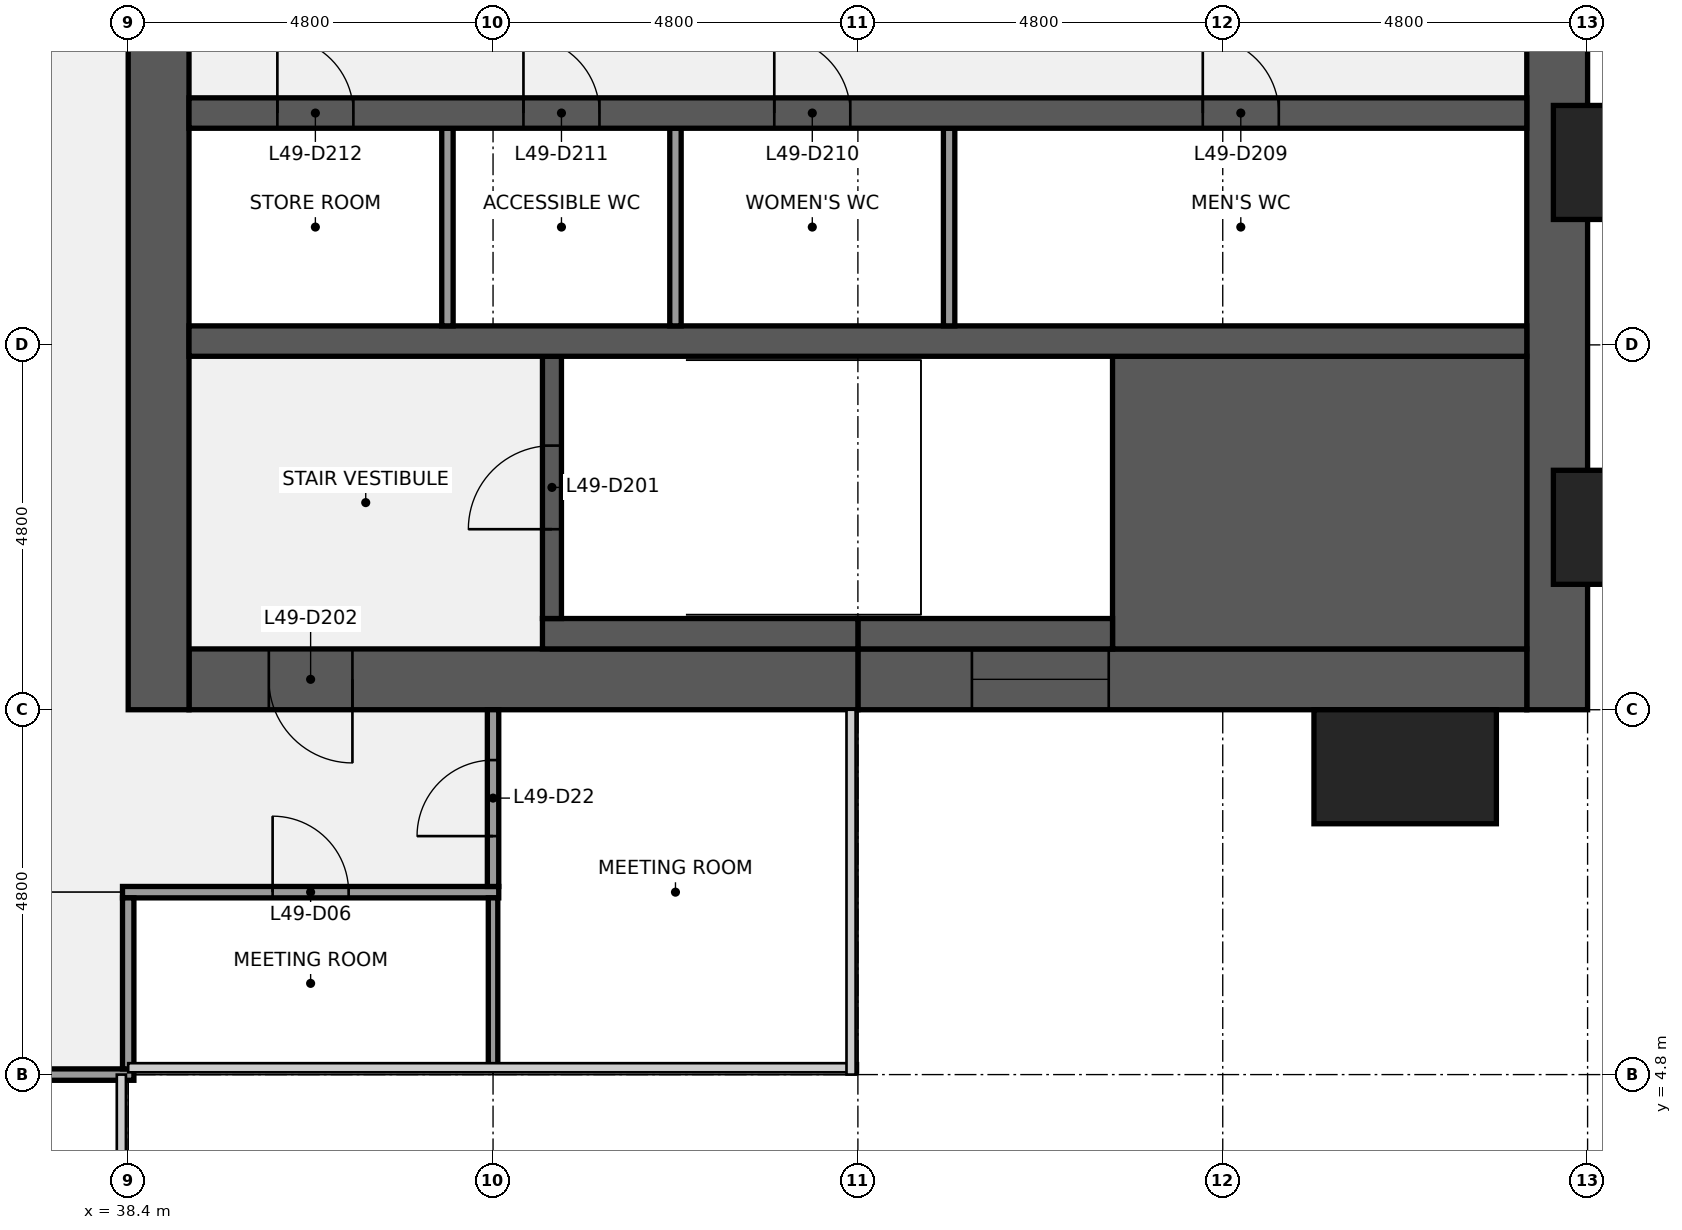
"""IFC4 building model, lengths in metres.
Left out: names, types, materials, properties, quantities, classifications, styles, units other than length and angle.
Written with IfcOpenShell. Run it as: python <this file> out.ifc"""

import sys

from ifc_helpers import new_model, si_unit, direction, frame, frame_2d, origin, origin_2d, place, context, subcontext, project, spatial, rectangle, extrude, element, fill, save


model = new_model("IFC4")
c1 = context("Model", 3, precision=1e-05, world=origin(), true_north=direction((0.0, 1.0)))
c2 = subcontext(c1, "Body", "Model", "MODEL_VIEW")
j1 = project(units=[si_unit("LENGTHUNIT", "METRE"), si_unit("PLANEANGLEUNIT", "RADIAN")], contexts=[c1])
p1 = place(None, origin())
s1 = spatial("IfcSite", under=j1, at=p1, CompositionType="ELEMENT")
p2 = place(p1, origin())
s2 = spatial("IfcBuilding", under=s1, at=p2, CompositionType="ELEMENT")
p3 = place(p2, frame((0.0, 0.0, 225.2)))
s3 = spatial("IfcBuildingStorey", under=s2, at=p3, CompositionType="ELEMENT", Elevation=225.2)
p4 = place(p3, frame((57.2, 38.4, 0.0), z_axis=(0.0, 0.0, 1.0), x_axis=(0.0, -1.0, 0.0)))
e1 = element("IfcWall", 1, at=p4, inside=s3, PredefinedType="SHEAR", context=c2, shape_type="SweptSolid", body=[
    extrude(rectangle(XDim=28.8, YDim=0.8, at=frame_2d((14.4, 0.0))), origin(), (0.0, 0.0, 1.0), 3.84),
])
p5 = place(p4, frame((18.45, 0.0, 0.9)))
e2 = element("IfcOpeningElement", 2, at=p5, cuts=e1, PredefinedType="OPENING", context=c2, shape_type="SweptSolid", body=[
    extrude(rectangle(XDim=1.5, YDim=1.5, at=frame_2d((0.75, 0.75))), frame((0.0, 0.41, 0.0), z_axis=(0.0, -1.0, 0.0), x_axis=(1.0, 0.0, 0.0)), (0.0, 0.0, 1.0), 0.82),
])
p6 = place(p4, frame((8.85, 0.0, 0.9)))
e3 = element("IfcOpeningElement", 3, at=p6, cuts=e1, PredefinedType="OPENING", context=c2, shape_type="SweptSolid", body=[
    extrude(rectangle(XDim=1.5, YDim=1.5, at=frame_2d((0.75, 0.75))), frame((0.0, 0.41, 0.0), z_axis=(0.0, -1.0, 0.0), x_axis=(1.0, 0.0, 0.0)), (0.0, 0.0, 1.0), 0.82),
])
p7 = place(p3, frame((56.8, 10.0, 0.0), z_axis=(0.0, 0.0, 1.0), x_axis=(-1.0, 0.0, 0.0)))
e4 = element("IfcWall", 4, at=p7, inside=s3, PredefinedType="SHEAR", context=c2, shape_type="SweptSolid", body=[
    extrude(rectangle(XDim=8.8, YDim=0.8, at=frame_2d((4.4, 0.0))), origin(), (0.0, 0.0, 1.0), 3.84),
])
p8 = place(p7, frame((5.5, 0.0, 0.9)))
e5 = element("IfcOpeningElement", 5, at=p8, cuts=e4, PredefinedType="OPENING", context=c2, shape_type="SweptSolid", body=[
    extrude(rectangle(XDim=1.8, YDim=1.5, at=frame_2d((0.9, 0.75))), frame((0.0, 0.41, 0.0), z_axis=(0.0, -1.0, 0.0), x_axis=(1.0, 0.0, 0.0)), (0.0, 0.0, 1.0), 0.82),
])
p9 = place(p3, frame((48.0, 10.0, 0.0), z_axis=(0.0, 0.0, 1.0), x_axis=(-1.0, 0.0, 0.0)))
e6 = element("IfcWall", 6, at=p9, inside=s3, PredefinedType="SHEAR", context=c2, shape_type="SweptSolid", body=[
    extrude(rectangle(XDim=8.8, YDim=0.8, at=frame_2d((4.4, 0.0))), origin(), (0.0, 0.0, 1.0), 3.84),
])
p10 = place(p9, frame((6.65, 0.0, 0.0)))
e7 = element("IfcOpeningElement", 7, at=p10, cuts=e6, PredefinedType="OPENING", context=c2, shape_type="SweptSolid", body=[
    extrude(rectangle(XDim=1.1, YDim=2.1, at=frame_2d((0.55, 1.05))), frame((0.0, 0.41, 0.0), z_axis=(0.0, -1.0, 0.0), x_axis=(1.0, 0.0, 0.0)), (0.0, 0.0, 1.0), 0.82),
])
p11 = place(p3, frame((38.8, 9.6, 0.0), z_axis=(0.0, 0.0, 1.0), x_axis=(0.0, 1.0, 0.0)))
e8 = element("IfcWall", 8, at=p11, inside=s3, PredefinedType="SHEAR", context=c2, shape_type="SweptSolid", body=[
    extrude(rectangle(XDim=28.8, YDim=0.8, at=frame_2d((14.4, 0.0))), origin(), (0.0, 0.0, 1.0), 3.84),
])
p12 = place(p11, frame((8.7, 0.0, 0.0)))
e9 = element("IfcOpeningElement", 9, at=p12, cuts=e8, PredefinedType="OPENING", context=c2, shape_type="SweptSolid", body=[
    extrude(rectangle(XDim=1.8, YDim=2.1, at=frame_2d((0.9, 1.05))), frame((0.0, 0.41, 0.0), z_axis=(0.0, -1.0, 0.0), x_axis=(1.0, 0.0, 0.0)), (0.0, 0.0, 1.0), 0.82),
])
p13 = place(p11, frame((18.3, 0.0, 0.0)))
e10 = element("IfcOpeningElement", 10, at=p13, cuts=e8, PredefinedType="OPENING", context=c2, shape_type="SweptSolid", body=[
    extrude(rectangle(XDim=1.8, YDim=2.1, at=frame_2d((0.9, 1.05))), frame((0.0, 0.41, 0.0), z_axis=(0.0, -1.0, 0.0), x_axis=(1.0, 0.0, 0.0)), (0.0, 0.0, 1.0), 0.82),
])
p14 = place(p3, frame((51.35, 12.325, 0.0), z_axis=(0.0, 0.0, 1.0), x_axis=(1.0, 0.0, 0.0)))
e11 = element("IfcWall", 11, at=p14, inside=s3, PredefinedType="SHEAR", context=c2, shape_type="SweptSolid", body=[
    extrude(rectangle(XDim=5.45, YDim=3.85, at=frame_2d((2.725, 0.0))), origin(), (0.0, 0.0, 1.0), 3.84),
])
p15 = place(p3, frame((48.0, 10.6, 0.0), z_axis=(0.0, 0.0, 1.0), x_axis=(1.0, 0.0, 0.0)))
e12 = element("IfcWall", 12, at=p15, inside=s3, PredefinedType="SHEAR", context=c2, shape_type="SweptSolid", body=[
    extrude(rectangle(XDim=3.35, YDim=0.4, at=frame_2d((1.675, 0.0))), origin(), (0.0, 0.0, 1.0), 3.84),
])
p16 = place(p3, frame((43.85, 10.6, 0.0), z_axis=(0.0, 0.0, 1.0), x_axis=(1.0, 0.0, 0.0)))
e13 = element("IfcWall", 13, at=p16, inside=s3, PredefinedType="SHEAR", context=c2, shape_type="SweptSolid", body=[
    extrude(rectangle(XDim=4.15, YDim=0.4, at=frame_2d((2.075, 0.0))), origin(), (0.0, 0.0, 1.0), 3.84),
])
p17 = place(p3, frame((43.975, 10.8, 0.0), z_axis=(0.0, 0.0, 1.0), x_axis=(0.0, 1.0, 0.0)))
e14 = element("IfcWall", 14, at=p17, inside=s3, PredefinedType="SHEAR", context=c2, shape_type="SweptSolid", body=[
    extrude(rectangle(XDim=3.45, YDim=0.25, at=frame_2d((1.725, 0.0))), origin(), (0.0, 0.0, 1.0), 3.84),
])
p18 = place(p17, frame((1.175, 0.0, 0.0)))
e15 = element("IfcOpeningElement", 15, at=p18, cuts=e14, PredefinedType="OPENING", context=c2, shape_type="SweptSolid", body=[
    extrude(rectangle(XDim=1.1, YDim=2.1, at=frame_2d((0.55, 1.05))), frame((0.0, 0.135, 0.0), z_axis=(0.0, -1.0, 0.0), x_axis=(1.0, 0.0, 0.0)), (0.0, 0.0, 1.0), 0.27),
])
p19 = place(p3, frame((39.2, 14.45, 0.0), z_axis=(0.0, 0.0, 1.0), x_axis=(1.0, 0.0, 0.0)))
e16 = element("IfcWall", 16, at=p19, inside=s3, PredefinedType="SHEAR", context=c2, shape_type="SweptSolid", body=[
    extrude(rectangle(XDim=17.6, YDim=0.4, at=frame_2d((8.8, 0.0))), origin(), (0.0, 0.0, 1.0), 3.84),
])
for number, where, z_axis, x_axis in (
    (17, (49.2, 14.65, 0.0), (0.0, 0.0, 1.0), (0.0, 1.0, 0.0)),
    (18, (45.6, 14.65, 0.0), (0.0, 0.0, 1.0), (0.0, 1.0, 0.0)),
    (19, (42.6, 14.65, 0.0), (0.0, 0.0, 1.0), (0.0, 1.0, 0.0)),
):
    element("IfcWall", number, at=place(p3, frame(where, z_axis=z_axis, x_axis=x_axis)), inside=s3, PredefinedType="PARTITIONING", context=c2, shape_type="SweptSolid", body=[
        extrude(rectangle(XDim=2.6, YDim=0.15, at=frame_2d((1.3, 0.0))), origin(), (0.0, 0.0, 1.0), 3.84),
    ])
p20 = place(p3, frame((39.2, 17.45, 0.0), z_axis=(0.0, 0.0, 1.0), x_axis=(1.0, 0.0, 0.0)))
e20 = element("IfcWall", 20, at=p20, inside=s3, PredefinedType="SHEAR", context=c2, shape_type="SweptSolid", body=[
    extrude(rectangle(XDim=17.6, YDim=0.4, at=frame_2d((8.8, 0.0))), origin(), (0.0, 0.0, 1.0), 3.84),
])
p21 = place(p20, frame((13.337, 0.0, 0.0)))
e21 = element("IfcOpeningElement", 21, at=p21, cuts=e20, PredefinedType="OPENING", context=c2, shape_type="SweptSolid", body=[
    extrude(rectangle(XDim=1.0, YDim=2.1, at=frame_2d((0.5, 1.05))), frame((0.0, 0.21, 0.0), z_axis=(0.0, -1.0, 0.0), x_axis=(1.0, 0.0, 0.0)), (0.0, 0.0, 1.0), 0.42),
])
p22 = place(p20, frame((7.7, 0.0, 0.0)))
e22 = element("IfcOpeningElement", 22, at=p22, cuts=e20, PredefinedType="OPENING", context=c2, shape_type="SweptSolid", body=[
    extrude(rectangle(XDim=1.0, YDim=2.1, at=frame_2d((0.5, 1.05))), frame((0.0, 0.21, 0.0), z_axis=(0.0, -1.0, 0.0), x_axis=(1.0, 0.0, 0.0)), (0.0, 0.0, 1.0), 0.42),
])
p23 = place(p20, frame((4.4, 0.0, 0.0)))
e23 = element("IfcOpeningElement", 23, at=p23, cuts=e20, PredefinedType="OPENING", context=c2, shape_type="SweptSolid", body=[
    extrude(rectangle(XDim=1.0, YDim=2.1, at=frame_2d((0.5, 1.05))), frame((0.0, 0.21, 0.0), z_axis=(0.0, -1.0, 0.0), x_axis=(1.0, 0.0, 0.0)), (0.0, 0.0, 1.0), 0.42),
])
p24 = place(p20, frame((1.163, 0.0, 0.0)))
e24 = element("IfcOpeningElement", 24, at=p24, cuts=e20, PredefinedType="OPENING", context=c2, shape_type="SweptSolid", body=[
    extrude(rectangle(XDim=1.0, YDim=2.1, at=frame_2d((0.5, 1.05))), frame((0.0, 0.21, 0.0), z_axis=(0.0, -1.0, 0.0), x_axis=(1.0, 0.0, 0.0)), (0.0, 0.0, 1.0), 0.42),
])
p25 = place(p3, frame((19.125, 4.8, 0.0), z_axis=(0.0, 0.0, 1.0), x_axis=(1.0, 0.0, 0.0)))
e25 = element("IfcWall", 25, at=p25, inside=s3, PredefinedType="PARTITIONING", context=c2, shape_type="SweptSolid", body=[
    extrude(rectangle(XDim=19.35, YDim=0.15, at=frame_2d((9.675, 0.0))), origin(), (0.0, 0.0, 1.0), 2.87),
])
p26 = place(p25, frame((0.775, 0.0, 0.0)))
e26 = element("IfcOpeningElement", 26, at=p26, cuts=e25, PredefinedType="OPENING", context=c2, shape_type="SweptSolid", body=[
    extrude(rectangle(XDim=1.0, YDim=2.1, at=frame_2d((0.5, 1.05))), frame((0.0, 0.085, 0.0), z_axis=(0.0, -1.0, 0.0), x_axis=(1.0, 0.0, 0.0)), (0.0, 0.0, 1.0), 0.17),
])
p27 = place(p25, frame((10.375, 0.0, 0.0)))
e27 = element("IfcOpeningElement", 27, at=p27, cuts=e25, PredefinedType="OPENING", context=c2, shape_type="SweptSolid", body=[
    extrude(rectangle(XDim=1.0, YDim=2.1, at=frame_2d((0.5, 1.05))), frame((0.0, 0.085, 0.0), z_axis=(0.0, -1.0, 0.0), x_axis=(1.0, 0.0, 0.0)), (0.0, 0.0, 1.0), 0.17),
])
p28 = place(p3, frame((38.325, 7.2, 0.0), z_axis=(0.0, 0.0, 1.0), x_axis=(1.0, 0.0, 0.0)))
e28 = element("IfcWall", 28, at=p28, inside=s3, PredefinedType="PARTITIONING", context=c2, shape_type="SweptSolid", body=[
    extrude(rectangle(XDim=4.95, YDim=0.15, at=frame_2d((2.475, 0.0))), origin(), (0.0, 0.0, 1.0), 2.87),
])
p29 = place(p28, frame((1.975, 0.0, 0.0)))
e29 = element("IfcOpeningElement", 29, at=p29, cuts=e28, PredefinedType="OPENING", context=c2, shape_type="SweptSolid", body=[
    extrude(rectangle(XDim=1.0, YDim=2.1, at=frame_2d((0.5, 1.05))), frame((0.0, 0.085, 0.0), z_axis=(0.0, -1.0, 0.0), x_axis=(1.0, 0.0, 0.0)), (0.0, 0.0, 1.0), 0.17),
])
p30 = place(p3, frame((38.4, 4.875, 0.0), z_axis=(0.0, 0.0, 1.0), x_axis=(0.0, 1.0, 0.0)))
e30 = element("IfcWall", 30, at=p30, inside=s3, PredefinedType="PARTITIONING", context=c2, shape_type="SweptSolid", body=[
    extrude(rectangle(XDim=2.25, YDim=0.15, at=frame_2d((1.125, 0.0))), origin(), (0.0, 0.0, 1.0), 2.87),
])
p31 = place(p3, frame((43.2, 4.9, 0.0), z_axis=(0.0, 0.0, 1.0), x_axis=(0.0, 1.0, 0.0)))
e31 = element("IfcWall", 31, at=p31, inside=s3, PredefinedType="PARTITIONING", context=c2, shape_type="SweptSolid", body=[
    extrude(rectangle(XDim=2.225, YDim=0.125, at=frame_2d((1.113, 0.0))), origin(), (0.0, 0.0, 1.0), 2.87),
])
p32 = place(p3, frame((43.2, 7.275, 0.0), z_axis=(0.0, 0.0, 1.0), x_axis=(0.0, 1.0, 0.0)))
e32 = element("IfcWall", 32, at=p32, inside=s3, PredefinedType="PARTITIONING", context=c2, shape_type="SweptSolid", body=[
    extrude(rectangle(XDim=2.325, YDim=0.15, at=frame_2d((1.163, 0.0))), origin(), (0.0, 0.0, 1.0), 2.87),
])
p33 = place(p32, frame((0.663, 0.0, 0.0)))
e33 = element("IfcOpeningElement", 33, at=p33, cuts=e32, PredefinedType="OPENING", context=c2, shape_type="SweptSolid", body=[
    extrude(rectangle(XDim=1.0, YDim=2.1, at=frame_2d((0.5, 1.05))), frame((0.0, 0.085, 0.0), z_axis=(0.0, -1.0, 0.0), x_axis=(1.0, 0.0, 0.0)), (0.0, 0.0, 1.0), 0.17),
])
for number, where, z_axis, x_axis in (
    (34, (55.2, 8.85, 0.0), (0.0, 0.0, 1.0), (1.0, 0.0, 0.0)),
    (35, (58.35, 12.0, 0.0), (0.0, 0.0, 1.0), (0.0, 1.0, 0.0)),
    (36, (58.35, 16.8, 0.0), (0.0, 0.0, 1.0), (0.0, 1.0, 0.0)),
):
    element("IfcColumn", number, at=place(p3, frame(where, z_axis=z_axis, x_axis=x_axis)), inside=s3, PredefinedType="PILASTER", context=c2, shape_type="SweptSolid", body=[
        extrude(rectangle(XDim=2.4, YDim=1.5, at=origin_2d()), origin(), (0.0, 0.0, 1.0), 4.0),
    ])
p34 = place(p18, origin())
e37 = element("IfcDoor", 37, at=p34, inside=s3, OperationType="SINGLE_SWING_LEFT", PredefinedType="DOOR", context=c2, shape_type="SweptSolid", body=[
    extrude(rectangle(XDim=1.1, YDim=2.1, at=frame_2d((0.55, 1.05))), frame((0.0, 0.025, 0.0), z_axis=(0.0, -1.0, 0.0), x_axis=(1.0, 0.0, 0.0)), (0.0, 0.0, 1.0), 0.05),
])
fill(e15, e37)
p35 = place(p10, origin())
e38 = element("IfcDoor", 38, at=p35, inside=s3, OperationType="SINGLE_SWING_LEFT", PredefinedType="DOOR", context=c2, shape_type="SweptSolid", body=[
    extrude(rectangle(XDim=1.1, YDim=2.1, at=frame_2d((0.55, 1.05))), frame((0.0, 0.025, 0.0), z_axis=(0.0, -1.0, 0.0), x_axis=(1.0, 0.0, 0.0)), (0.0, 0.0, 1.0), 0.05),
])
fill(e7, e38)
p36 = place(p21, origin())
e39 = element("IfcDoor", 39, at=p36, inside=s3, OperationType="SINGLE_SWING_LEFT", PredefinedType="DOOR", context=c2, shape_type="SweptSolid", body=[
    extrude(rectangle(XDim=1.0, YDim=2.1, at=frame_2d((0.5, 1.05))), frame((0.0, 0.025, 0.0), z_axis=(0.0, -1.0, 0.0), x_axis=(1.0, 0.0, 0.0)), (0.0, 0.0, 1.0), 0.05),
])
fill(e21, e39)
p37 = place(p22, origin())
e40 = element("IfcDoor", 40, at=p37, inside=s3, OperationType="SINGLE_SWING_LEFT", PredefinedType="DOOR", context=c2, shape_type="SweptSolid", body=[
    extrude(rectangle(XDim=1.0, YDim=2.1, at=frame_2d((0.5, 1.05))), frame((0.0, 0.025, 0.0), z_axis=(0.0, -1.0, 0.0), x_axis=(1.0, 0.0, 0.0)), (0.0, 0.0, 1.0), 0.05),
])
fill(e22, e40)
p38 = place(p23, origin())
e41 = element("IfcDoor", 41, at=p38, inside=s3, OperationType="SINGLE_SWING_LEFT", PredefinedType="DOOR", context=c2, shape_type="SweptSolid", body=[
    extrude(rectangle(XDim=1.0, YDim=2.1, at=frame_2d((0.5, 1.05))), frame((0.0, 0.025, 0.0), z_axis=(0.0, -1.0, 0.0), x_axis=(1.0, 0.0, 0.0)), (0.0, 0.0, 1.0), 0.05),
])
fill(e23, e41)
p39 = place(p24, origin())
e42 = element("IfcDoor", 42, at=p39, inside=s3, OperationType="SINGLE_SWING_LEFT", PredefinedType="DOOR", context=c2, shape_type="SweptSolid", body=[
    extrude(rectangle(XDim=1.0, YDim=2.1, at=frame_2d((0.5, 1.05))), frame((0.0, 0.025, 0.0), z_axis=(0.0, -1.0, 0.0), x_axis=(1.0, 0.0, 0.0)), (0.0, 0.0, 1.0), 0.05),
])
fill(e24, e42)
p40 = place(p8, origin())
e43 = element("IfcWindow", 43, at=p40, inside=s3, PartitioningType="SINGLE_PANEL", PredefinedType="WINDOW", context=c2, shape_type="SweptSolid", body=[
    extrude(rectangle(XDim=1.8, YDim=1.5, at=frame_2d((0.9, 0.75))), frame((0.0, 0.03, 0.0), z_axis=(0.0, -1.0, 0.0), x_axis=(1.0, 0.0, 0.0)), (0.0, 0.0, 1.0), 0.06),
])
fill(e5, e43)
p41 = place(p29, origin())
e44 = element("IfcDoor", 44, at=p41, inside=s3, OperationType="SINGLE_SWING_LEFT", PredefinedType="DOOR", context=c2, shape_type="SweptSolid", body=[
    extrude(rectangle(XDim=1.0, YDim=2.1, at=frame_2d((0.5, 1.05))), frame((0.0, 0.025, 0.0), z_axis=(0.0, -1.0, 0.0), x_axis=(1.0, 0.0, 0.0)), (0.0, 0.0, 1.0), 0.05),
])
fill(e29, e44)
p42 = place(p33, origin())
e45 = element("IfcDoor", 45, at=p42, inside=s3, OperationType="SINGLE_SWING_LEFT", PredefinedType="DOOR", context=c2, shape_type="SweptSolid", body=[
    extrude(rectangle(XDim=1.0, YDim=2.1, at=frame_2d((0.5, 1.05))), frame((0.0, 0.025, 0.0), z_axis=(0.0, -1.0, 0.0), x_axis=(1.0, 0.0, 0.0)), (0.0, 0.0, 1.0), 0.05),
])
fill(e33, e45)
save(model, sys.argv[1])
